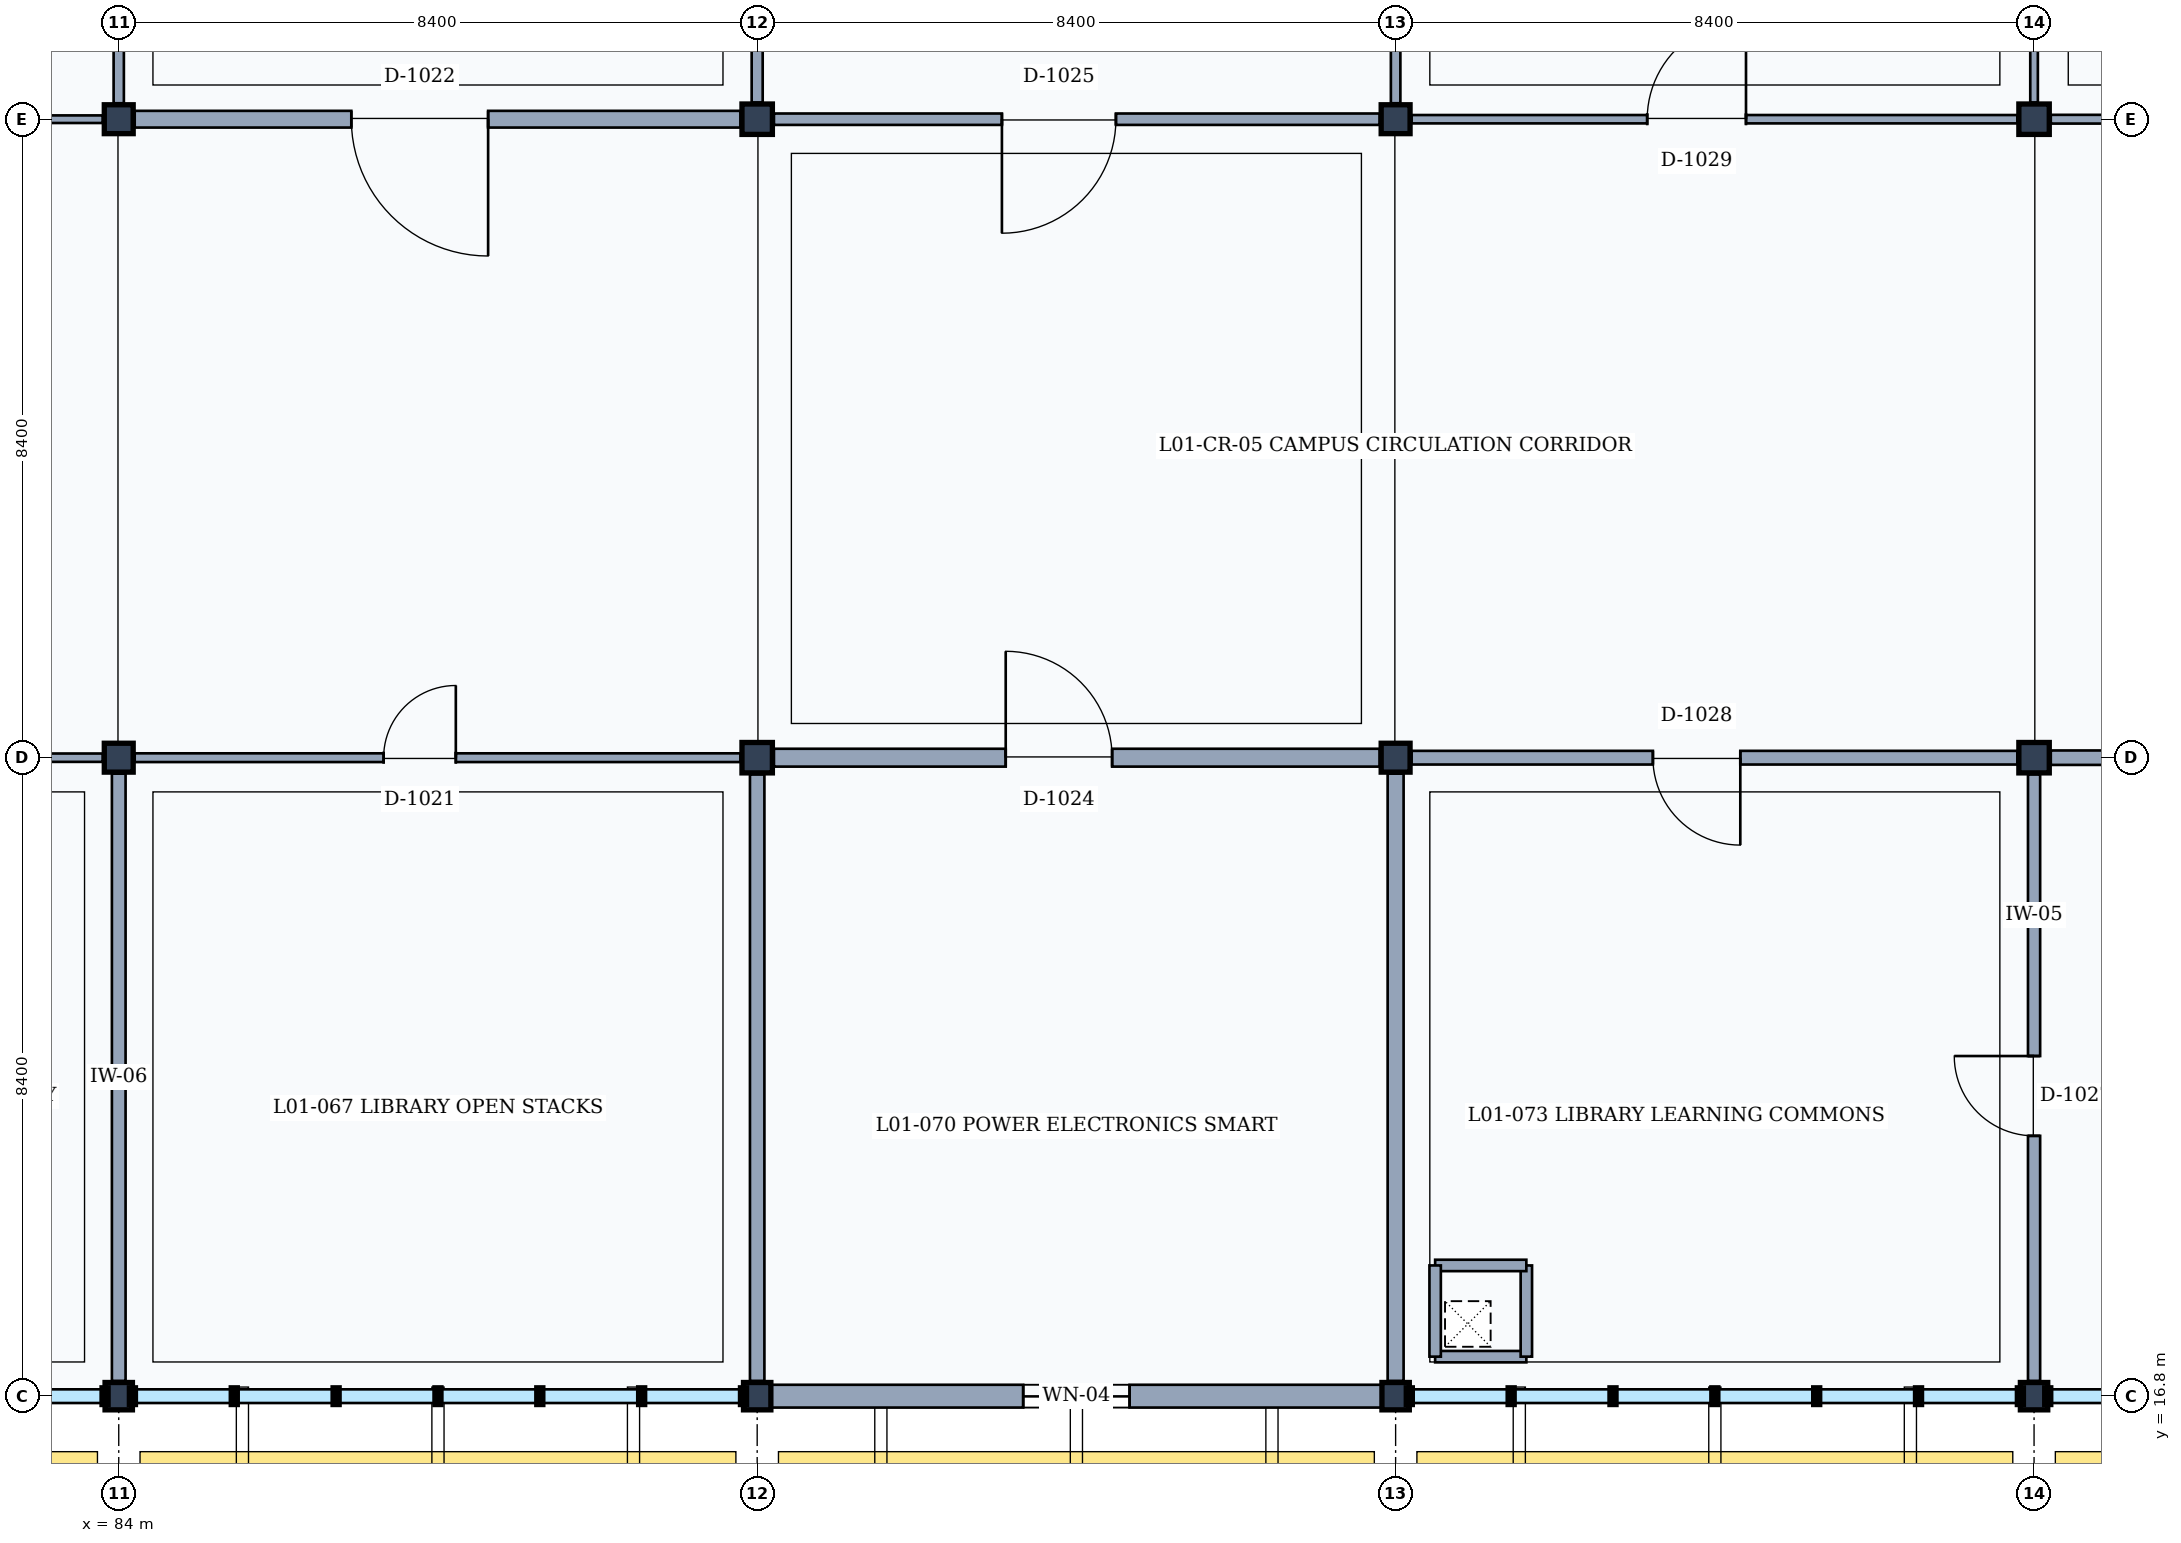
"""IFC4 building model, lengths in metres.
Left out: names, types, materials, properties, quantities, classifications, styles, units other than length and angle.
Written with IfcOpenShell. Run it as: python <this file> out.ifc"""

import sys

from ifc_helpers import new_model, si_unit, direction, frame, frame_2d, origin, origin_2d, place, context, subcontext, project, spatial, rectangle, extrude, element, fill, save


model = new_model("IFC4")
c1 = context("Model", 3, precision=1e-05, world=origin(), true_north=direction((0.0, 1.0)))
c2 = subcontext(c1, "Body", "Model", "MODEL_VIEW")
j1 = project(units=[si_unit("LENGTHUNIT", "METRE"), si_unit("PLANEANGLEUNIT", "RADIAN")], contexts=[c1])
p1 = place(None, origin())
s1 = spatial("IfcSite", under=j1, at=p1, CompositionType="ELEMENT")
p2 = place(p1, origin())
s2 = spatial("IfcBuilding", under=s1, at=p2, CompositionType="ELEMENT")
p3 = place(p2, frame((0.0, 0.0, 4.8)))
s3 = spatial("IfcBuildingStorey", under=s2, at=p3, CompositionType="ELEMENT", Elevation=4.8)
p4 = place(p3, frame((84.0, 16.8, 0.0), z_axis=(0.0, 0.0, 1.0), x_axis=(1.0, 0.0, 0.0)))
e1 = element("IfcColumn", 1, at=p4, inside=s3, PredefinedType="COLUMN", context=c2, shape_type="SweptSolid", body=[
    extrude(rectangle(XDim=0.36, YDim=0.36, at=origin_2d()), origin(), (0.0, 0.0, 1.0), 4.8),
])
for number, where, z_axis, x_axis in (
    (2, (84.0, 25.2, 0.0), (0.0, 0.0, 1.0), (1.0, 0.0, 0.0)),
    (3, (84.0, 33.6, 0.0), (0.0, 0.0, 1.0), (1.0, 0.0, 0.0)),
):
    element("IfcColumn", number, at=place(p3, frame(where, z_axis=z_axis, x_axis=x_axis)), inside=s3, PredefinedType="COLUMN", context=c2, shape_type="SweptSolid", body=[
        extrude(rectangle(XDim=0.38, YDim=0.38, at=origin_2d()), origin(), (0.0, 0.0, 1.0), 4.8),
    ])
p5 = place(p3, frame((92.4, 16.8, 0.0), z_axis=(0.0, 0.0, 1.0), x_axis=(1.0, 0.0, 0.0)))
e4 = element("IfcColumn", 4, at=p5, inside=s3, PredefinedType="COLUMN", context=c2, shape_type="SweptSolid", body=[
    extrude(rectangle(XDim=0.36, YDim=0.36, at=origin_2d()), origin(), (0.0, 0.0, 1.0), 4.8),
])
for number, where, z_axis, x_axis in (
    (5, (92.4, 25.2, 0.0), (0.0, 0.0, 1.0), (1.0, 0.0, 0.0)),
    (6, (92.4, 33.6, 0.0), (0.0, 0.0, 1.0), (1.0, 0.0, 0.0)),
):
    element("IfcColumn", number, at=place(p3, frame(where, z_axis=z_axis, x_axis=x_axis)), inside=s3, PredefinedType="COLUMN", context=c2, shape_type="SweptSolid", body=[
        extrude(rectangle(XDim=0.4, YDim=0.4, at=origin_2d()), origin(), (0.0, 0.0, 1.0), 4.8),
    ])
p6 = place(p3, frame((100.8, 16.8, 0.0), z_axis=(0.0, 0.0, 1.0), x_axis=(1.0, 0.0, 0.0)))
e7 = element("IfcColumn", 7, at=p6, inside=s3, PredefinedType="COLUMN", context=c2, shape_type="SweptSolid", body=[
    extrude(rectangle(XDim=0.36, YDim=0.36, at=origin_2d()), origin(), (0.0, 0.0, 1.0), 4.8),
])
for number, where, z_axis, x_axis in (
    (8, (100.8, 25.2, 0.0), (0.0, 0.0, 1.0), (1.0, 0.0, 0.0)),
    (9, (100.8, 33.6, 0.0), (0.0, 0.0, 1.0), (1.0, 0.0, 0.0)),
):
    element("IfcColumn", number, at=place(p3, frame(where, z_axis=z_axis, x_axis=x_axis)), inside=s3, PredefinedType="COLUMN", context=c2, shape_type="SweptSolid", body=[
        extrude(rectangle(XDim=0.38, YDim=0.38, at=origin_2d()), origin(), (0.0, 0.0, 1.0), 4.8),
    ])
p7 = place(p3, frame((109.2, 16.8, 0.0), z_axis=(0.0, 0.0, 1.0), x_axis=(1.0, 0.0, 0.0)))
e10 = element("IfcColumn", 10, at=p7, inside=s3, PredefinedType="COLUMN", context=c2, shape_type="SweptSolid", body=[
    extrude(rectangle(XDim=0.36, YDim=0.36, at=origin_2d()), origin(), (0.0, 0.0, 1.0), 4.8),
])
for number, where, z_axis, x_axis in (
    (11, (109.2, 25.2, 0.0), (0.0, 0.0, 1.0), (1.0, 0.0, 0.0)),
    (12, (109.2, 33.6, 0.0), (0.0, 0.0, 1.0), (1.0, 0.0, 0.0)),
):
    element("IfcColumn", number, at=place(p3, frame(where, z_axis=z_axis, x_axis=x_axis)), inside=s3, PredefinedType="COLUMN", context=c2, shape_type="SweptSolid", body=[
        extrude(rectangle(XDim=0.4, YDim=0.4, at=origin_2d()), origin(), (0.0, 0.0, 1.0), 4.8),
    ])
p8 = place(p3, frame((100.62, 16.8, 0.0), z_axis=(0.0, 0.0, 1.0), x_axis=(-1.0, 0.0, 0.0)))
e13 = element("IfcWall", 13, at=p8, inside=s3, PredefinedType="SOLIDWALL", context=c2, shape_type="SweptSolid", body=[
    extrude(rectangle(XDim=8.04, YDim=0.3, at=frame_2d((4.02, 0.0))), origin(), (0.0, 0.0, 1.0), 3.96),
])
p9 = place(p8, frame((3.32, 0.0, 0.9)))
e14 = element("IfcOpeningElement", 14, at=p9, cuts=e13, PredefinedType="OPENING", context=c2, shape_type="SweptSolid", body=[
    extrude(rectangle(XDim=1.4, YDim=2.1, at=frame_2d((0.7, 1.05))), frame((0.0, 0.16, 0.0), z_axis=(0.0, -1.0, 0.0), x_axis=(1.0, 0.0, 0.0)), (0.0, 0.0, 1.0), 0.32),
])
for number, where, z_axis, x_axis in (
    (15, (101.32, 17.32, 0.0), (0.0, 0.0, 1.0), (1.0, 0.0, 0.0)),
    (16, (102.52, 17.32, 0.0), (0.0, 0.0, 1.0), (0.0, 1.0, 0.0)),
    (17, (102.52, 18.52, 0.0), (0.0, 0.0, 1.0), (-1.0, 0.0, 0.0)),
    (18, (101.32, 18.52, 0.0), (0.0, 0.0, 1.0), (0.0, -1.0, 0.0)),
):
    element("IfcWall", number, at=place(p3, frame(where, z_axis=z_axis, x_axis=x_axis)), inside=s3, PredefinedType="PARTITIONING", context=c2, shape_type="SweptSolid", body=[
        extrude(rectangle(XDim=1.2, YDim=0.15, at=frame_2d((0.6, 0.0))), origin(), (0.0, 0.0, 1.0), 4.53),
    ])
p10 = place(p3, frame((84.0, 17.0, 0.0), z_axis=(0.0, 0.0, 1.0), x_axis=(0.0, 1.0, 0.0)))
e19 = element("IfcWall", 19, at=p10, inside=s3, PredefinedType="PARTITIONING", context=c2, shape_type="SweptSolid", body=[
    extrude(rectangle(XDim=7.99, YDim=0.18, at=frame_2d((3.995, 0.0))), origin(), (0.0, 0.0, 1.0), 3.92),
])
p11 = place(p3, frame((75.82, 25.2, 0.0), z_axis=(0.0, 0.0, 1.0), x_axis=(1.0, 0.0, 0.0)))
e20 = element("IfcWall", 20, at=p11, inside=s3, PredefinedType="PARTITIONING", context=c2, shape_type="SweptSolid", body=[
    extrude(rectangle(XDim=7.97, YDim=0.11, at=frame_2d((3.985, 0.0))), origin(), (0.0, 0.0, 1.0), 3.89),
])
p12 = place(p3, frame((75.82, 33.6, 0.0), z_axis=(0.0, 0.0, 1.0), x_axis=(1.0, 0.0, 0.0)))
e21 = element("IfcWall", 21, at=p12, inside=s3, PredefinedType="MOVABLE", context=c2, shape_type="SweptSolid", body=[
    extrude(rectangle(XDim=7.97, YDim=0.1, at=frame_2d((3.985, 0.0))), origin(), (0.0, 0.0, 1.0), 3.92),
])
p13 = place(p3, frame((84.0, 33.81, 0.0), z_axis=(0.0, 0.0, 1.0), x_axis=(0.0, 1.0, 0.0)))
e22 = element("IfcWall", 22, at=p13, inside=s3, PredefinedType="PARTITIONING", context=c2, shape_type="SweptSolid", body=[
    extrude(rectangle(XDim=7.98, YDim=0.135, at=frame_2d((3.99, 0.0))), origin(), (0.0, 0.0, 1.0), 3.92),
])
p14 = place(p3, frame((92.4, 17.0, 0.0), z_axis=(0.0, 0.0, 1.0), x_axis=(0.0, 1.0, 0.0)))
e23 = element("IfcWall", 23, at=p14, inside=s3, PredefinedType="PARTITIONING", context=c2, shape_type="SweptSolid", body=[
    extrude(rectangle(XDim=7.98, YDim=0.19, at=frame_2d((3.99, 0.0))), origin(), (0.0, 0.0, 1.0), 3.92),
])
p15 = place(p3, frame((84.21, 25.2, 0.0), z_axis=(0.0, 0.0, 1.0), x_axis=(1.0, 0.0, 0.0)))
e24 = element("IfcWall", 24, at=p15, inside=s3, PredefinedType="PARTITIONING", context=c2, shape_type="SweptSolid", body=[
    extrude(rectangle(XDim=7.97, YDim=0.115, at=frame_2d((3.985, 0.0))), origin(), (0.0, 0.0, 1.0), 3.89),
])
p16 = place(p15, frame((3.275, 0.0, 0.0)))
e25 = element("IfcOpeningElement", 25, at=p16, cuts=e24, PredefinedType="OPENING", context=c2, shape_type="SweptSolid", body=[
    extrude(rectangle(XDim=0.95, YDim=2.15, at=frame_2d((0.475, 1.075))), frame((0.0, 0.067, 0.0), z_axis=(0.0, -1.0, 0.0), x_axis=(1.0, 0.0, 0.0)), (0.0, 0.0, 1.0), 0.135),
])
p17 = place(p3, frame((84.21, 33.6, 0.0), z_axis=(0.0, 0.0, 1.0), x_axis=(1.0, 0.0, 0.0)))
e26 = element("IfcWall", 26, at=p17, inside=s3, PredefinedType="PARTITIONING", context=c2, shape_type="SweptSolid", body=[
    extrude(rectangle(XDim=7.97, YDim=0.22, at=frame_2d((3.985, 0.0))), origin(), (0.0, 0.0, 1.0), 3.92),
])
p18 = place(p17, frame((2.85, 0.0, 0.0)))
e27 = element("IfcOpeningElement", 27, at=p18, cuts=e26, PredefinedType="OPENING", context=c2, shape_type="SweptSolid", body=[
    extrude(rectangle(XDim=1.8, YDim=2.3, at=frame_2d((0.9, 1.15))), frame((0.0, 0.12, 0.0), z_axis=(0.0, -1.0, 0.0), x_axis=(1.0, 0.0, 0.0)), (0.0, 0.0, 1.0), 0.24),
])
p19 = place(p3, frame((92.4, 33.82, 0.0), z_axis=(0.0, 0.0, 1.0), x_axis=(0.0, 1.0, 0.0)))
e28 = element("IfcWall", 28, at=p19, inside=s3, PredefinedType="PARTITIONING", context=c2, shape_type="SweptSolid", body=[
    extrude(rectangle(XDim=7.96, YDim=0.145, at=frame_2d((3.98, 0.0))), origin(), (0.0, 0.0, 1.0), 3.92),
])
p20 = place(p3, frame((100.8, 17.0, 0.0), z_axis=(0.0, 0.0, 1.0), x_axis=(0.0, 1.0, 0.0)))
e29 = element("IfcWall", 29, at=p20, inside=s3, PredefinedType="PARTITIONING", context=c2, shape_type="SweptSolid", body=[
    extrude(rectangle(XDim=7.99, YDim=0.21, at=frame_2d((3.995, 0.0))), origin(), (0.0, 0.0, 1.0), 3.92),
])
p21 = place(p3, frame((92.62, 25.2, 0.0), z_axis=(0.0, 0.0, 1.0), x_axis=(1.0, 0.0, 0.0)))
e30 = element("IfcWall", 30, at=p21, inside=s3, PredefinedType="PARTITIONING", context=c2, shape_type="SweptSolid", body=[
    extrude(rectangle(XDim=7.97, YDim=0.235, at=frame_2d((3.985, 0.0))), origin(), (0.0, 0.0, 1.0), 3.89),
])
p22 = place(p21, frame((3.05, 0.0, 0.0)))
e31 = element("IfcOpeningElement", 31, at=p22, cuts=e30, PredefinedType="OPENING", context=c2, shape_type="SweptSolid", body=[
    extrude(rectangle(XDim=1.4, YDim=2.25, at=frame_2d((0.7, 1.125))), frame((0.0, 0.127, 0.0), z_axis=(0.0, -1.0, 0.0), x_axis=(1.0, 0.0, 0.0)), (0.0, 0.0, 1.0), 0.255),
])
p23 = place(p3, frame((92.62, 33.6, 0.0), z_axis=(0.0, 0.0, 1.0), x_axis=(1.0, 0.0, 0.0)))
e32 = element("IfcWall", 32, at=p23, inside=s3, PredefinedType="PARTITIONING", context=c2, shape_type="SweptSolid", body=[
    extrude(rectangle(XDim=7.97, YDim=0.15, at=frame_2d((3.985, 0.0))), origin(), (0.0, 0.0, 1.0), 3.92),
])
p24 = place(p23, frame((3.0, 0.0, 0.0)))
e33 = element("IfcOpeningElement", 33, at=p24, cuts=e32, PredefinedType="OPENING", context=c2, shape_type="SweptSolid", body=[
    extrude(rectangle(XDim=1.5, YDim=2.3, at=frame_2d((0.75, 1.15))), frame((0.0, 0.085, 0.0), z_axis=(0.0, -1.0, 0.0), x_axis=(1.0, 0.0, 0.0)), (0.0, 0.0, 1.0), 0.17),
])
p25 = place(p3, frame((100.8, 33.81, 0.0), z_axis=(0.0, 0.0, 1.0), x_axis=(0.0, 1.0, 0.0)))
e34 = element("IfcWall", 34, at=p25, inside=s3, PredefinedType="PARTITIONING", context=c2, shape_type="SweptSolid", body=[
    extrude(rectangle(XDim=7.98, YDim=0.125, at=frame_2d((3.99, 0.0))), origin(), (0.0, 0.0, 1.0), 3.92),
])
p26 = place(p3, frame((109.2, 17.0, 0.0), z_axis=(0.0, 0.0, 1.0), x_axis=(0.0, 1.0, 0.0)))
e35 = element("IfcWall", 35, at=p26, inside=s3, PredefinedType="PARTITIONING", context=c2, shape_type="SweptSolid", body=[
    extrude(rectangle(XDim=7.98, YDim=0.16, at=frame_2d((3.99, 0.0))), origin(), (0.0, 0.0, 1.0), 3.92),
])
p27 = place(p26, frame((3.225, 0.0, 0.0)))
e36 = element("IfcOpeningElement", 36, at=p27, cuts=e35, PredefinedType="OPENING", context=c2, shape_type="SweptSolid", body=[
    extrude(rectangle(XDim=1.05, YDim=2.2, at=frame_2d((0.525, 1.1))), frame((0.0, 0.09, 0.0), z_axis=(0.0, -1.0, 0.0), x_axis=(1.0, 0.0, 0.0)), (0.0, 0.0, 1.0), 0.18),
])
p28 = place(p3, frame((101.01, 25.2, 0.0), z_axis=(0.0, 0.0, 1.0), x_axis=(1.0, 0.0, 0.0)))
e37 = element("IfcWall", 37, at=p28, inside=s3, PredefinedType="PARTITIONING", context=c2, shape_type="SweptSolid", body=[
    extrude(rectangle(XDim=7.97, YDim=0.18, at=frame_2d((3.985, 0.0))), origin(), (0.0, 0.0, 1.0), 3.89),
])
p29 = place(p28, frame((3.175, 0.0, 0.0)))
e38 = element("IfcOpeningElement", 38, at=p29, cuts=e37, PredefinedType="OPENING", context=c2, shape_type="SweptSolid", body=[
    extrude(rectangle(XDim=1.15, YDim=2.25, at=frame_2d((0.575, 1.125))), frame((0.0, 0.1, 0.0), z_axis=(0.0, -1.0, 0.0), x_axis=(1.0, 0.0, 0.0)), (0.0, 0.0, 1.0), 0.2),
])
p30 = place(p3, frame((101.01, 33.6, 0.0), z_axis=(0.0, 0.0, 1.0), x_axis=(1.0, 0.0, 0.0)))
e39 = element("IfcWall", 39, at=p30, inside=s3, PredefinedType="PARTITIONING", context=c2, shape_type="SweptSolid", body=[
    extrude(rectangle(XDim=7.97, YDim=0.11, at=frame_2d((3.985, 0.0))), origin(), (0.0, 0.0, 1.0), 3.92),
])
p31 = place(p30, frame((3.1, 0.0, 0.0)))
e40 = element("IfcOpeningElement", 40, at=p31, cuts=e39, PredefinedType="OPENING", context=c2, shape_type="SweptSolid", body=[
    extrude(rectangle(XDim=1.3, YDim=2.2, at=frame_2d((0.65, 1.1))), frame((0.0, 0.065, 0.0), z_axis=(0.0, -1.0, 0.0), x_axis=(1.0, 0.0, 0.0)), (0.0, 0.0, 1.0), 0.13),
])
p32 = place(p3, frame((109.2, 33.82, 0.0), z_axis=(0.0, 0.0, 1.0), x_axis=(0.0, 1.0, 0.0)))
e41 = element("IfcWall", 41, at=p32, inside=s3, PredefinedType="MOVABLE", context=c2, shape_type="SweptSolid", body=[
    extrude(rectangle(XDim=7.96, YDim=0.1, at=frame_2d((3.98, 0.0))), origin(), (0.0, 0.0, 1.0), 3.92),
])
p33 = place(p32, frame((2.975, 0.0, 0.0)))
e42 = element("IfcOpeningElement", 42, at=p33, cuts=e41, PredefinedType="OPENING", context=c2, shape_type="SweptSolid", body=[
    extrude(rectangle(XDim=1.55, YDim=2.35, at=frame_2d((0.775, 1.175))), frame((0.0, 0.06, 0.0), z_axis=(0.0, -1.0, 0.0), x_axis=(1.0, 0.0, 0.0)), (0.0, 0.0, 1.0), 0.12),
])
p34 = place(p3, frame((109.42, 25.2, 0.0), z_axis=(0.0, 0.0, 1.0), x_axis=(1.0, 0.0, 0.0)))
e43 = element("IfcWall", 43, at=p34, inside=s3, PredefinedType="PARTITIONING", context=c2, shape_type="SweptSolid", body=[
    extrude(rectangle(XDim=7.97, YDim=0.19, at=frame_2d((3.985, 0.0))), origin(), (0.0, 0.0, 1.0), 3.89),
])
p35 = place(p3, frame((109.42, 33.6, 0.0), z_axis=(0.0, 0.0, 1.0), x_axis=(1.0, 0.0, 0.0)))
e44 = element("IfcWall", 44, at=p35, inside=s3, PredefinedType="PARTITIONING", context=c2, shape_type="SweptSolid", body=[
    extrude(rectangle(XDim=7.97, YDim=0.115, at=frame_2d((3.985, 0.0))), origin(), (0.0, 0.0, 1.0), 3.92),
])
p36 = place(p9, origin())
e45 = element("IfcWindow", 45, at=p36, inside=s3, PartitioningType="SINGLE_PANEL", PredefinedType="WINDOW", context=c2, shape_type="SweptSolid", body=[
    extrude(rectangle(XDim=1.4, YDim=2.1, at=frame_2d((0.7, 1.05))), frame((0.0, 0.03, 0.0), z_axis=(0.0, -1.0, 0.0), x_axis=(1.0, 0.0, 0.0)), (0.0, 0.0, 1.0), 0.06),
])
fill(e14, e45)
p37 = place(p16, origin())
e46 = element("IfcDoor", 46, at=p37, inside=s3, OperationType="SINGLE_SWING_RIGHT", PredefinedType="DOOR", context=c2, shape_type="SweptSolid", body=[
    extrude(rectangle(XDim=0.95, YDim=2.15, at=frame_2d((0.475, 1.075))), frame((0.0, 0.025, 0.0), z_axis=(0.0, -1.0, 0.0), x_axis=(1.0, 0.0, 0.0)), (0.0, 0.0, 1.0), 0.05),
])
fill(e25, e46)
p38 = place(p18, frame((1.8, 0.0, 0.0), z_axis=(0.0, 0.0, 1.0), x_axis=(-1.0, 0.0, 0.0)))
e47 = element("IfcDoor", 47, at=p38, inside=s3, OperationType="SINGLE_SWING_LEFT", PredefinedType="DOOR", context=c2, shape_type="SweptSolid", body=[
    extrude(rectangle(XDim=1.8, YDim=2.3, at=frame_2d((0.9, 1.15))), frame((0.0, 0.025, 0.0), z_axis=(0.0, -1.0, 0.0), x_axis=(1.0, 0.0, 0.0)), (0.0, 0.0, 1.0), 0.05),
])
fill(e27, e47)
p39 = place(p22, origin())
e48 = element("IfcDoor", 48, at=p39, inside=s3, OperationType="SINGLE_SWING_LEFT", PredefinedType="DOOR", context=c2, shape_type="SweptSolid", body=[
    extrude(rectangle(XDim=1.4, YDim=2.25, at=frame_2d((0.7, 1.125))), frame((0.0, 0.025, 0.0), z_axis=(0.0, -1.0, 0.0), x_axis=(1.0, 0.0, 0.0)), (0.0, 0.0, 1.0), 0.05),
])
fill(e31, e48)
p40 = place(p24, frame((1.5, 0.0, 0.0), z_axis=(0.0, 0.0, 1.0), x_axis=(-1.0, 0.0, 0.0)))
e49 = element("IfcDoor", 49, at=p40, inside=s3, OperationType="SINGLE_SWING_RIGHT", PredefinedType="DOOR", context=c2, shape_type="SweptSolid", body=[
    extrude(rectangle(XDim=1.5, YDim=2.3, at=frame_2d((0.75, 1.15))), frame((0.0, 0.025, 0.0), z_axis=(0.0, -1.0, 0.0), x_axis=(1.0, 0.0, 0.0)), (0.0, 0.0, 1.0), 0.05),
])
fill(e33, e49)
p41 = place(p27, origin())
e50 = element("IfcDoor", 50, at=p41, inside=s3, OperationType="SINGLE_SWING_RIGHT", PredefinedType="DOOR", context=c2, shape_type="SweptSolid", body=[
    extrude(rectangle(XDim=1.05, YDim=2.2, at=frame_2d((0.525, 1.1))), frame((0.0, 0.025, 0.0), z_axis=(0.0, -1.0, 0.0), x_axis=(1.0, 0.0, 0.0)), (0.0, 0.0, 1.0), 0.05),
])
fill(e36, e50)
p42 = place(p29, frame((1.15, 0.0, 0.0), z_axis=(0.0, 0.0, 1.0), x_axis=(-1.0, 0.0, 0.0)))
e51 = element("IfcDoor", 51, at=p42, inside=s3, OperationType="SINGLE_SWING_LEFT", PredefinedType="DOOR", context=c2, shape_type="SweptSolid", body=[
    extrude(rectangle(XDim=1.15, YDim=2.25, at=frame_2d((0.575, 1.125))), frame((0.0, 0.025, 0.0), z_axis=(0.0, -1.0, 0.0), x_axis=(1.0, 0.0, 0.0)), (0.0, 0.0, 1.0), 0.05),
])
fill(e38, e51)
p43 = place(p31, origin())
e52 = element("IfcDoor", 52, at=p43, inside=s3, OperationType="SINGLE_SWING_RIGHT", PredefinedType="DOOR", context=c2, shape_type="SweptSolid", body=[
    extrude(rectangle(XDim=1.3, YDim=2.2, at=frame_2d((0.65, 1.1))), frame((0.0, 0.025, 0.0), z_axis=(0.0, -1.0, 0.0), x_axis=(1.0, 0.0, 0.0)), (0.0, 0.0, 1.0), 0.05),
])
fill(e40, e52)
save(model, sys.argv[1])
